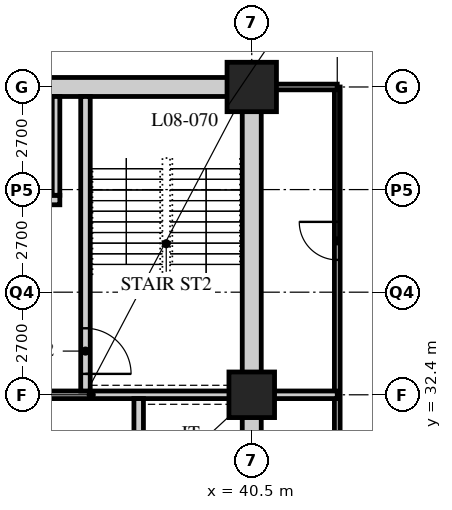
"""IFC4 building model, lengths in metres.
Left out: names, types, materials, properties, quantities, classifications, styles, units other than length and angle.
Written with IfcOpenShell. Run it as: python <this file> out.ifc"""

import sys

from ifc_helpers import new_model, si_unit, direction, frame, frame_2d, origin, origin_2d, place, context, subcontext, project, spatial, rectangle, hollow_rectangle, extrude, element, fill, save


model = new_model("IFC4")
c1 = context("Model", 3, precision=1e-05, world=origin(), true_north=direction((0.0, 1.0)))
c2 = subcontext(c1, "Body", "Model", "MODEL_VIEW")
j1 = project(units=[si_unit("LENGTHUNIT", "METRE"), si_unit("PLANEANGLEUNIT", "RADIAN")], contexts=[c1])
p1 = place(None, origin())
s1 = spatial("IfcSite", under=j1, at=p1, CompositionType="ELEMENT")
p2 = place(p1, origin())
s2 = spatial("IfcBuilding", under=s1, at=p2, CompositionType="ELEMENT")
p3 = place(p2, frame((0.0, 0.0, 39.8)))
s3 = spatial("IfcBuildingStorey", under=s2, at=p3, CompositionType="ELEMENT", Elevation=39.8)
p4 = place(p3, frame((40.5, 32.4, 0.0), z_axis=(0.0, 0.0, 1.0), x_axis=(1.0, 0.0, 0.0)))
e1 = element("IfcColumn", 1, at=p4, inside=s3, PredefinedType="COLUMN", context=c2, shape_type="SweptSolid", body=[
    extrude(hollow_rectangle(XDim=1.2, YDim=1.2, WallThickness=0.12, at=origin_2d()), origin(), (0.0, 0.0, 1.0), 3.4),
])
p5 = place(p3, frame((40.5, 40.5, 0.0), z_axis=(0.0, 0.0, 1.0), x_axis=(1.0, 0.0, 0.0)))
e2 = element("IfcColumn", 2, at=p5, inside=s3, PredefinedType="COLUMN", context=c2, shape_type="SweptSolid", body=[
    extrude(hollow_rectangle(XDim=1.3, YDim=1.3, WallThickness=0.13, at=origin_2d()), origin(), (0.0, 0.0, 1.0), 3.4),
])
p6 = place(p3, frame((42.75, 18.0, 0.0), z_axis=(0.0, 0.0, 1.0), x_axis=(0.0, 1.0, 0.0)))
e3 = element("IfcWall", 3, at=p6, inside=s3, PredefinedType="PARTITIONING", context=c2, shape_type="SweptSolid", body=[
    extrude(rectangle(XDim=22.5, YDim=0.15, at=frame_2d((11.25, 0.0))), origin(), (0.0, 0.0, 1.0), 3.19),
])
p7 = place(p6, frame((9.85, 0.0, 0.0)))
e4 = element("IfcOpeningElement", 4, at=p7, cuts=e3, PredefinedType="OPENING", context=c2, shape_type="SweptSolid", body=[
    extrude(rectangle(XDim=1.0, YDim=2.1, at=frame_2d((0.5, 1.05))), frame((0.0, 0.085, 0.0), z_axis=(0.0, -1.0, 0.0), x_axis=(1.0, 0.0, 0.0)), (0.0, 0.0, 1.0), 0.17),
])
p8 = place(p6, frame((17.95, 0.0, 0.0)))
e5 = element("IfcOpeningElement", 5, at=p8, cuts=e3, PredefinedType="OPENING", context=c2, shape_type="SweptSolid", body=[
    extrude(rectangle(XDim=1.0, YDim=2.1, at=frame_2d((0.5, 1.05))), frame((0.0, 0.085, 0.0), z_axis=(0.0, -1.0, 0.0), x_axis=(1.0, 0.0, 0.0)), (0.0, 0.0, 1.0), 0.17),
])
p9 = place(p3, frame((42.75, 40.5, 0.0), z_axis=(0.0, 0.0, 1.0), x_axis=(-1.0, 0.0, 0.0)))
e6 = element("IfcWall", 6, at=p9, inside=s3, PredefinedType="PARTITIONING", context=c2, shape_type="SweptSolid", body=[
    extrude(rectangle(XDim=2.05, YDim=0.15, at=frame_2d((1.025, 0.0))), origin(), (0.0, 0.0, 1.0), 2.578),
])
p10 = place(p3, frame((40.5, 32.4, 0.0), z_axis=(0.0, 0.0, 1.0), x_axis=(1.0, 0.0, 0.0)))
e7 = element("IfcWall", 7, at=p10, inside=s3, PredefinedType="SOLIDWALL", context=c2, shape_type="SweptSolid", body=[
    extrude(rectangle(XDim=2.25, YDim=0.2, at=frame_2d((1.125, 0.0))), origin(), (0.0, 0.0, 1.0), 2.578),
])
p11 = place(p3, frame((15.95, 40.5, 0.0), z_axis=(0.0, 0.0, 1.0), x_axis=(1.0, 0.0, 0.0)))
e8 = element("IfcWall", 8, at=p11, inside=s3, PredefinedType="SOLIDWALL", context=c2, shape_type="SweptSolid", body=[
    extrude(rectangle(XDim=24.8, YDim=0.5, at=frame_2d((12.4, 0.0))), origin(), (0.0, 0.0, 1.0), 2.54),
])
p12 = place(p11, frame((11.5, 0.0, 0.0)))
e9 = element("IfcOpeningElement", 9, at=p12, cuts=e8, PredefinedType="OPENING", context=c2, shape_type="SweptSolid", body=[
    extrude(rectangle(XDim=1.8, YDim=2.4, at=frame_2d((0.9, 1.2))), frame((0.0, 0.26, 0.0), z_axis=(0.0, -1.0, 0.0), x_axis=(1.0, 0.0, 0.0)), (0.0, 0.0, 1.0), 0.52),
])
p13 = place(p3, frame((40.5, 24.55, 0.0), z_axis=(0.0, 0.0, 1.0), x_axis=(0.0, 1.0, 0.0)))
e10 = element("IfcWall", 10, at=p13, inside=s3, PredefinedType="SOLIDWALL", context=c2, shape_type="SweptSolid", body=[
    extrude(rectangle(XDim=15.7, YDim=0.5, at=frame_2d((7.85, 0.0))), origin(), (0.0, 0.0, 1.0), 2.578),
])
p14 = place(p3, frame((32.3, 32.4, 0.0), z_axis=(0.0, 0.0, 1.0), x_axis=(1.0, 0.0, 0.0)))
e11 = element("IfcWall", 11, at=p14, inside=s3, PredefinedType="SOLIDWALL", context=c2, shape_type="SweptSolid", body=[
    extrude(rectangle(XDim=7.95, YDim=0.2, at=frame_2d((3.975, 0.0))), origin(), (0.0, 0.0, 1.0), 2.578),
])
p15 = place(p3, frame((37.525, 24.55, 0.0), z_axis=(0.0, 0.0, 1.0), x_axis=(0.0, 1.0, 0.0)))
e12 = element("IfcWall", 12, at=p15, inside=s3, PredefinedType="SOLIDWALL", context=c2, shape_type="SweptSolid", body=[
    extrude(rectangle(XDim=7.75, YDim=0.25, at=frame_2d((3.875, 0.0))), origin(), (0.0, 0.0, 1.0), 3.19),
])
p16 = place(p3, frame((36.125, 32.5, 0.0), z_axis=(0.0, 0.0, 1.0), x_axis=(0.0, 1.0, 0.0)))
e13 = element("IfcWall", 13, at=p16, inside=s3, PredefinedType="SOLIDWALL", context=c2, shape_type="SweptSolid", body=[
    extrude(rectangle(XDim=7.75, YDim=0.25, at=frame_2d((3.875, 0.0))), origin(), (0.0, 0.0, 1.0), 3.19),
])
p17 = place(p16, frame((0.45, 0.0, 0.0)))
e14 = element("IfcOpeningElement", 14, at=p17, cuts=e13, PredefinedType="OPENING", context=c2, shape_type="SweptSolid", body=[
    extrude(rectangle(XDim=1.2, YDim=2.1, at=frame_2d((0.6, 1.05))), frame((0.0, 0.135, 0.0), z_axis=(0.0, -1.0, 0.0), x_axis=(1.0, 0.0, 0.0)), (0.0, 0.0, 1.0), 0.27),
])
p18 = place(p3, frame((32.5, 37.525, 0.0), z_axis=(0.0, 0.0, 1.0), x_axis=(1.0, 0.0, 0.0)))
e15 = element("IfcWall", 15, at=p18, inside=s3, PredefinedType="SOLIDWALL", context=c2, shape_type="SweptSolid", body=[
    extrude(rectangle(XDim=2.95, YDim=0.25, at=frame_2d((1.475, 0.0))), origin(), (0.0, 0.0, 1.0), 3.19),
])
p19 = place(p18, frame((0.9, 0.0, 0.0)))
e16 = element("IfcOpeningElement", 16, at=p19, cuts=e15, PredefinedType="OPENING", context=c2, shape_type="SweptSolid", body=[
    extrude(rectangle(XDim=1.1, YDim=2.4, at=frame_2d((0.55, 1.2))), frame((0.0, 0.135, 0.0), z_axis=(0.0, -1.0, 0.0), x_axis=(1.0, 0.0, 0.0)), (0.0, 0.0, 1.0), 0.27),
])
p20 = place(p3, frame((35.35, 37.65, 0.0), z_axis=(0.0, 0.0, 1.0), x_axis=(0.0, 1.0, 0.0)))
e17 = element("IfcWall", 17, at=p20, inside=s3, PredefinedType="SOLIDWALL", context=c2, shape_type="SweptSolid", body=[
    extrude(rectangle(XDim=2.6, YDim=0.2, at=frame_2d((1.3, 0.0))), origin(), (0.0, 0.0, 1.0), 3.19),
])
p21 = place(p8, origin())
e18 = element("IfcDoor", 18, at=p21, inside=s3, OperationType="SINGLE_SWING_RIGHT", PredefinedType="DOOR", context=c2, shape_type="SweptSolid", body=[
    extrude(rectangle(XDim=1.0, YDim=2.1, at=frame_2d((0.5, 1.05))), frame((0.0, 0.025, 0.0), z_axis=(0.0, -1.0, 0.0), x_axis=(1.0, 0.0, 0.0)), (0.0, 0.0, 1.0), 0.05),
])
fill(e5, e18)
p22 = place(p17, origin())
e19 = element("IfcDoor", 19, at=p22, inside=s3, OperationType="SINGLE_SWING_RIGHT", PredefinedType="DOOR", context=c2, shape_type="SweptSolid", body=[
    extrude(rectangle(XDim=1.2, YDim=2.1, at=frame_2d((0.6, 1.05))), frame((0.0, 0.025, 0.0), z_axis=(0.0, -1.0, 0.0), x_axis=(1.0, 0.0, 0.0)), (0.0, 0.0, 1.0), 0.05),
])
fill(e14, e19)
save(model, sys.argv[1])
